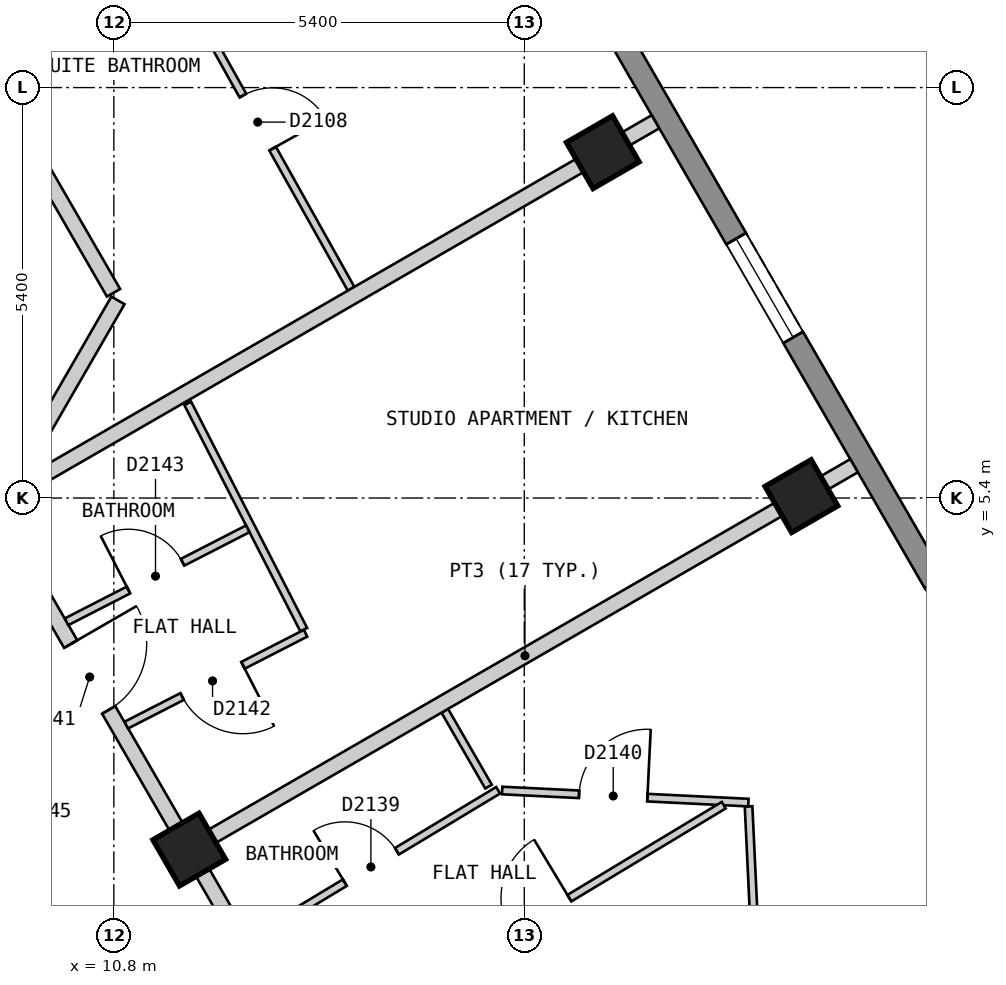
"""IFC4 building model, lengths in metres.
Left out: names, types, materials, properties, quantities, classifications, styles, units other than length and angle.
Written with IfcOpenShell. Run it as: python <this file> out.ifc"""

import sys

from ifc_helpers import new_model, si_unit, direction, frame, frame_2d, origin, origin_2d, place, context, subcontext, project, spatial, polyline, rectangle, outline, extrude, element, fill, save


model = new_model("IFC4")
c1 = context("Model", 3, precision=1e-05, world=origin(), true_north=direction((0.0, 1.0)))
c2 = subcontext(c1, "Body", "Model", "MODEL_VIEW")
j1 = project(units=[si_unit("LENGTHUNIT", "METRE"), si_unit("PLANEANGLEUNIT", "RADIAN")], contexts=[c1])
p1 = place(None, origin())
s1 = spatial("IfcSite", under=j1, at=p1, CompositionType="ELEMENT")
p2 = place(p1, origin())
s2 = spatial("IfcBuilding", under=s1, at=p2, CompositionType="ELEMENT")
p3 = place(p2, frame((0.0, 0.0, 205.8)))
s3 = spatial("IfcBuildingStorey", under=s2, at=p3, CompositionType="ELEMENT", Elevation=205.8)
for number, where, z_axis, x_axis in (
    (1, (19.846, 5.425, 0.0), (0.0, 0.0, 1.0), (-0.5, 0.866, 0.0)),
    (2, (17.233, 9.95, 0.0), (0.0, 0.0, 1.0), (-0.5, 0.866, 0.0)),
    (3, (11.792, 0.775, 0.0), (0.0, 0.0, 1.0), (-0.5, 0.866, 0.0)),
):
    element("IfcColumn", number, at=place(p3, frame(where, z_axis=z_axis, x_axis=x_axis)), inside=s3, PredefinedType="COLUMN", context=c2, shape_type="SweptSolid", body=[
        extrude(rectangle(XDim=0.7, YDim=0.7, at=origin_2d()), origin(), (0.0, 0.0, 1.0), 3.0),
    ])
p4 = place(p3, frame((23.599, 0.825, 0.0), z_axis=(0.0, 0.0, 1.0), x_axis=(-0.500003656944, 0.866023292436, 0.0)))
e4 = element("IfcWall", 4, at=p4, inside=s3, PredefinedType="SOLIDWALL", context=c2, shape_type="SweptSolid", body=[
    extrude(outline(polyline([(0.0, -0.15), (22.17, -0.15), (22.09, 0.15), (0.08, 0.15), (0.0, -0.15)])), origin(), (0.0, 0.0, 1.0), 2.7),
])
p5 = place(p4, frame((2.497, 0.0, 0.15)))
e5 = element("IfcOpeningElement", 5, at=p5, cuts=e4, PredefinedType="OPENING", context=c2, shape_type="SweptSolid", body=[
    extrude(rectangle(XDim=1.5, YDim=2.1, at=frame_2d((0.75, 1.05))), frame((0.0, 0.16, 0.0), z_axis=(0.0, -1.0, 0.0), x_axis=(1.0, 0.0, 0.0)), (0.0, 0.0, 1.0), 0.32),
])
p6 = place(p4, frame((7.723, 0.0, 0.15)))
e6 = element("IfcOpeningElement", 6, at=p6, cuts=e4, PredefinedType="OPENING", context=c2, shape_type="SweptSolid", body=[
    extrude(rectangle(XDim=1.5, YDim=2.1, at=frame_2d((0.75, 1.05))), frame((0.0, 0.16, 0.0), z_axis=(0.0, -1.0, 0.0), x_axis=(1.0, 0.0, 0.0)), (0.0, 0.0, 1.0), 0.32),
])
p7 = place(p4, frame((12.948, 0.0, 0.15)))
e7 = element("IfcOpeningElement", 7, at=p7, cuts=e4, PredefinedType="OPENING", context=c2, shape_type="SweptSolid", body=[
    extrude(rectangle(XDim=1.5, YDim=2.1, at=frame_2d((0.75, 1.05))), frame((0.0, 0.16, 0.0), z_axis=(0.0, -1.0, 0.0), x_axis=(1.0, 0.0, 0.0)), (0.0, 0.0, 1.0), 0.32),
])
p8 = place(p4, frame((18.173, 0.0, 0.15)))
e8 = element("IfcOpeningElement", 8, at=p8, cuts=e4, PredefinedType="OPENING", context=c2, shape_type="SweptSolid", body=[
    extrude(rectangle(XDim=1.5, YDim=2.1, at=frame_2d((0.75, 1.05))), frame((0.0, 0.16, 0.0), z_axis=(0.0, -1.0, 0.0), x_axis=(1.0, 0.0, 0.0)), (0.0, 0.0, 1.0), 0.32),
])
p9 = place(p3, frame((8.026, 2.899, 0.0), z_axis=(0.0, 0.0, 1.0), x_axis=(0.499986018985, -0.866033475577, 0.0)))
e9 = element("IfcWall", 9, at=p9, inside=s3, PredefinedType="PARTITIONING", context=c2, shape_type="SweptSolid", body=[
    extrude(rectangle(XDim=5.078, YDim=0.2, at=frame_2d((2.539, 0.0))), origin(), (0.0, 0.0, 1.0), 2.7),
])
p10 = place(p9, frame((2.089, 0.0, 0.0)))
e10 = element("IfcOpeningElement", 10, at=p10, cuts=e9, PredefinedType="OPENING", context=c2, shape_type="SweptSolid", body=[
    extrude(rectangle(XDim=0.9, YDim=2.1, at=frame_2d((0.45, 1.05))), frame((0.0, 0.11, 0.0), z_axis=(0.0, -1.0, 0.0), x_axis=(1.0, 0.0, 0.0)), (0.0, 0.0, 1.0), 0.22),
])
p11 = place(p3, frame((9.238, 5.2, 0.0), z_axis=(0.0, 0.0, 1.0), x_axis=(0.500025705601, -0.86601056214, 0.0)))
e11 = element("IfcWall", 11, at=p11, inside=s3, PredefinedType="PARTITIONING", context=c2, shape_type="SweptSolid", body=[
    extrude(rectangle(XDim=7.735, YDim=0.2, at=frame_2d((3.868, 0.0))), origin(), (0.0, 0.0, 1.0), 2.7),
])
p12 = place(p11, frame((6.705, 0.0, 0.0)))
e12 = element("IfcOpeningElement", 12, at=p12, cuts=e11, PredefinedType="OPENING", context=c2, shape_type="SweptSolid", body=[
    extrude(rectangle(XDim=1.0, YDim=2.1, at=frame_2d((0.5, 1.05))), frame((0.0, 0.11, 0.0), z_axis=(0.0, -1.0, 0.0), x_axis=(1.0, 0.0, 0.0)), (0.0, 0.0, 1.0), 0.22),
])
p13 = place(p11, frame((1.988, 0.0, 0.0)))
e13 = element("IfcOpeningElement", 13, at=p13, cuts=e11, PredefinedType="OPENING", context=c2, shape_type="SweptSolid", body=[
    extrude(rectangle(XDim=1.0, YDim=2.1, at=frame_2d((0.5, 1.05))), frame((0.0, 0.11, 0.0), z_axis=(0.0, -1.0, 0.0), x_axis=(1.0, 0.0, 0.0)), (0.0, 0.0, 1.0), 0.22),
])
p14 = place(p3, frame((5.485, 17.3, 0.0), z_axis=(0.0, 0.0, 1.0), x_axis=(0.499943285704, -0.866058145322, 0.0)))
e14 = element("IfcWall", 14, at=p14, inside=s3, PredefinedType="PARTITIONING", context=c2, shape_type="SweptSolid", body=[
    extrude(rectangle(XDim=10.623, YDim=0.2, at=frame_2d((5.312, 0.0))), origin(), (0.0, 0.0, 1.0), 2.7),
])
p15 = place(p3, frame((9.454, 5.574, 0.0), z_axis=(0.0, 0.0, 1.0), x_axis=(0.499795394297, 0.86614350072, 0.0)))
e15 = element("IfcWall", 15, at=p15, inside=s3, PredefinedType="PARTITIONING", context=c2, shape_type="SweptSolid", body=[
    extrude(rectangle(XDim=2.801, YDim=0.2, at=frame_2d((1.4, 0.0))), origin(), (0.0, 0.0, 1.0), 2.7),
])
p16 = place(p3, frame((15.154, 2.601, 0.0), z_axis=(0.0, 0.0, 1.0), x_axis=(0.499808046739, -0.866136199691, 0.0)))
e16 = element("IfcWall", 16, at=p16, inside=s3, PredefinedType="PARTITIONING", context=c2, shape_type="SweptSolid", body=[
    extrude(rectangle(XDim=1.152, YDim=0.1, at=frame_2d((0.576, 0.0))), origin(), (0.0, 0.0, 1.0), 2.7),
])
p17 = place(p3, frame((11.441, 12.582, 0.0), z_axis=(0.0, 0.0, 1.0), x_axis=(0.488568218554, -0.872525699231, 0.0)))
e17 = element("IfcWall", 17, at=p17, inside=s3, PredefinedType="PARTITIONING", context=c2, shape_type="SweptSolid", body=[
    extrude(rectangle(XDim=5.076, YDim=0.1, at=frame_2d((2.538, 0.0))), origin(), (0.0, 0.0, 1.0), 2.7),
])
p18 = place(p17, frame((2.163, 0.0, 0.0)))
e18 = element("IfcOpeningElement", 18, at=p18, cuts=e17, PredefinedType="OPENING", context=c2, shape_type="SweptSolid", body=[
    extrude(rectangle(XDim=0.8, YDim=2.1, at=frame_2d((0.4, 1.05))), frame((0.0, 0.06, 0.0), z_axis=(0.0, -1.0, 0.0), x_axis=(1.0, 0.0, 0.0)), (0.0, 0.0, 1.0), 0.12),
])
p19 = place(p3, frame((11.772, 6.646, 0.0), z_axis=(0.0, 0.0, 1.0), x_axis=(0.456175983405, -0.889889584254, 0.0)))
e19 = element("IfcWall", 19, at=p19, inside=s3, PredefinedType="PARTITIONING", context=c2, shape_type="SweptSolid", body=[
    extrude(rectangle(XDim=3.348, YDim=0.1, at=frame_2d((1.674, 0.0))), origin(), (0.0, 0.0, 1.0), 2.7),
])
p20 = place(p3, frame((19.151, 1.343, 0.0), z_axis=(0.0, 0.0, 1.0), x_axis=(0.047509130714, -0.998870803707, 0.0)))
e20 = element("IfcWall", 20, at=p20, inside=s3, PredefinedType="PARTITIONING", context=c2, shape_type="SweptSolid", body=[
    extrude(rectangle(XDim=3.52, YDim=0.1, at=frame_2d((1.76, 0.0))), origin(), (0.0, 0.0, 1.0), 2.7),
])
p21 = place(p3, frame((15.909, 1.552, 0.0), z_axis=(0.0, 0.0, 1.0), x_axis=(0.998799003463, -0.048995414909, 0.0)))
e21 = element("IfcWall", 21, at=p21, inside=s3, PredefinedType="PARTITIONING", context=c2, shape_type="SweptSolid", body=[
    extrude(rectangle(XDim=3.244, YDim=0.1, at=frame_2d((1.622, 0.0))), origin(), (0.0, 0.0, 1.0), 2.7),
])
p22 = place(p21, frame((1.013, 0.0, 0.0)))
e22 = element("IfcOpeningElement", 22, at=p22, cuts=e21, PredefinedType="OPENING", context=c2, shape_type="SweptSolid", body=[
    extrude(rectangle(XDim=0.9, YDim=2.1, at=frame_2d((0.45, 1.05))), frame((0.0, 0.06, 0.0), z_axis=(0.0, -1.0, 0.0), x_axis=(1.0, 0.0, 0.0)), (0.0, 0.0, 1.0), 0.12),
])
p23 = place(p3, frame((10.178, 3.772, 0.0), z_axis=(0.0, 0.0, 1.0), x_axis=(0.889732071959, 0.456483121405, 0.0)))
e23 = element("IfcWall", 23, at=p23, inside=s3, PredefinedType="PARTITIONING", context=c2, shape_type="SweptSolid", body=[
    extrude(rectangle(XDim=2.679, YDim=0.1, at=frame_2d((1.34, 0.0))), origin(), (0.0, 0.0, 1.0), 2.7),
])
p24 = place(p23, frame((0.915, 0.0, 0.0)))
e24 = element("IfcOpeningElement", 24, at=p24, cuts=e23, PredefinedType="OPENING", context=c2, shape_type="SweptSolid", body=[
    extrude(rectangle(XDim=0.8, YDim=2.1, at=frame_2d((0.4, 1.05))), frame((0.0, 0.06, 0.0), z_axis=(0.0, -1.0, 0.0), x_axis=(1.0, 0.0, 0.0)), (0.0, 0.0, 1.0), 0.12),
])
p25 = place(p3, frame((10.963, 2.412, 0.0), z_axis=(0.0, 0.0, 1.0), x_axis=(0.889943997558, 0.456069820543, 0.0)))
e25 = element("IfcWall", 25, at=p25, inside=s3, PredefinedType="PARTITIONING", context=c2, shape_type="SweptSolid", body=[
    extrude(rectangle(XDim=2.651, YDim=0.1, at=frame_2d((1.325, 0.0))), origin(), (0.0, 0.0, 1.0), 2.7),
])
p26 = place(p25, frame((0.826, 0.0, 0.0)))
e26 = element("IfcOpeningElement", 26, at=p26, cuts=e25, PredefinedType="OPENING", context=c2, shape_type="SweptSolid", body=[
    extrude(rectangle(XDim=0.9, YDim=2.1, at=frame_2d((0.45, 1.05))), frame((0.0, 0.06, 0.0), z_axis=(0.0, -1.0, 0.0), x_axis=(1.0, 0.0, 0.0)), (0.0, 0.0, 1.0), 0.12),
])
p27 = place(p3, frame((9.079, 11.275, 0.0), z_axis=(0.0, 0.0, 1.0), x_axis=(0.866001485781, 0.500041424909, 0.0)))
e27 = element("IfcWall", 27, at=p27, inside=s3, PredefinedType="PARTITIONING", context=c2, shape_type="SweptSolid", body=[
    extrude(rectangle(XDim=7.2, YDim=0.1, at=frame_2d((3.6, 0.0))), origin(), (0.0, 0.0, 1.0), 2.7),
])
p28 = place(p27, frame((4.5, 0.0, 0.0)))
e28 = element("IfcOpeningElement", 28, at=p28, cuts=e27, PredefinedType="OPENING", context=c2, shape_type="SweptSolid", body=[
    extrude(rectangle(XDim=0.9, YDim=2.1, at=frame_2d((0.45, 1.05))), frame((0.0, 0.06, 0.0), z_axis=(0.0, -1.0, 0.0), x_axis=(1.0, 0.0, 0.0)), (0.0, 0.0, 1.0), 0.12),
])
p29 = place(p3, frame((12.593, -0.411, 0.0), z_axis=(0.0, 0.0, 1.0), x_axis=(0.856558445359, 0.516050026339, 0.0)))
e29 = element("IfcWall", 29, at=p29, inside=s3, PredefinedType="PARTITIONING", context=c2, shape_type="SweptSolid", body=[
    extrude(rectangle(XDim=3.809, YDim=0.1, at=frame_2d((1.905, 0.0))), origin(), (0.0, 0.0, 1.0), 2.7),
])
p30 = place(p29, frame((1.455, 0.0, 0.0)))
e30 = element("IfcOpeningElement", 30, at=p30, cuts=e29, PredefinedType="OPENING", context=c2, shape_type="SweptSolid", body=[
    extrude(rectangle(XDim=0.8, YDim=2.1, at=frame_2d((0.4, 1.05))), frame((0.0, 0.06, 0.0), z_axis=(0.0, -1.0, 0.0), x_axis=(1.0, 0.0, 0.0)), (0.0, 0.0, 1.0), 0.12),
])
p31 = place(p3, frame((14.081, -1.499, 0.0), z_axis=(0.0, 0.0, 1.0), x_axis=(0.85652273816, 0.516109289798, 0.0)))
e31 = element("IfcWall", 31, at=p31, inside=s3, PredefinedType="PARTITIONING", context=c2, shape_type="SweptSolid", body=[
    extrude(rectangle(XDim=5.537, YDim=0.1, at=frame_2d((2.769, 0.0))), origin(), (0.0, 0.0, 1.0), 2.7),
])
p32 = place(p31, frame((2.267, 0.0, 0.0)))
e32 = element("IfcOpeningElement", 32, at=p32, cuts=e31, PredefinedType="OPENING", context=c2, shape_type="SweptSolid", body=[
    extrude(rectangle(XDim=0.9, YDim=2.1, at=frame_2d((0.45, 1.05))), frame((0.0, 0.06, 0.0), z_axis=(0.0, -1.0, 0.0), x_axis=(1.0, 0.0, 0.0)), (0.0, 0.0, 1.0), 0.12),
])
p33 = place(p3, frame((11.879, 0.826, 0.0), z_axis=(0.0, 0.0, 1.0), x_axis=(0.866065245018, 0.499930986609, 0.0)))
e33 = element("IfcWall", 33, at=p33, inside=s3, PredefinedType="PARTITIONING", context=c2, shape_type="SweptSolid", body=[
    extrude(rectangle(XDim=10.0, YDim=0.2, at=frame_2d((5.0, 0.0))), origin(), (0.0, 0.0, 1.0), 2.7),
])
p34 = place(p3, frame((9.354, 5.401, 0.0), z_axis=(0.0, 0.0, 1.0), x_axis=(0.866018411306, 0.500012111133, 0.0)))
e34 = element("IfcWall", 34, at=p34, inside=s3, PredefinedType="PARTITIONING", context=c2, shape_type="SweptSolid", body=[
    extrude(rectangle(XDim=9.898, YDim=0.2, at=frame_2d((4.949, 0.0))), origin(), (0.0, 0.0, 1.0), 2.7),
])
p35 = place(p6, origin())
e35 = element("IfcWindow", 35, at=p35, inside=s3, PartitioningType="SINGLE_PANEL", PredefinedType="WINDOW", context=c2, shape_type="SweptSolid", body=[
    extrude(rectangle(XDim=1.5, YDim=2.1, at=frame_2d((0.75, 1.05))), frame((0.0, 0.03, 0.0), z_axis=(0.0, -1.0, 0.0), x_axis=(1.0, 0.0, 0.0)), (0.0, 0.0, 1.0), 0.06),
])
fill(e6, e35)
p36 = place(p18, origin())
e36 = element("IfcDoor", 36, at=p36, inside=s3, OperationType="SINGLE_SWING_RIGHT", PredefinedType="DOOR", context=c2, shape_type="SweptSolid", body=[
    extrude(rectangle(XDim=0.8, YDim=2.1, at=frame_2d((0.4, 1.05))), frame((0.0, 0.025, 0.0), z_axis=(0.0, -1.0, 0.0), x_axis=(1.0, 0.0, 0.0)), (0.0, 0.0, 1.0), 0.05),
])
fill(e18, e36)
p37 = place(p32, origin())
e37 = element("IfcDoor", 37, at=p37, inside=s3, OperationType="SINGLE_SWING_RIGHT", PredefinedType="DOOR", context=c2, shape_type="SweptSolid", body=[
    extrude(rectangle(XDim=0.9, YDim=2.1, at=frame_2d((0.45, 1.05))), frame((0.0, 0.025, 0.0), z_axis=(0.0, -1.0, 0.0), x_axis=(1.0, 0.0, 0.0)), (0.0, 0.0, 1.0), 0.05),
])
fill(e32, e37)
p38 = place(p30, origin())
e38 = element("IfcDoor", 38, at=p38, inside=s3, OperationType="SINGLE_SWING_LEFT", PredefinedType="DOOR", context=c2, shape_type="SweptSolid", body=[
    extrude(rectangle(XDim=0.8, YDim=2.1, at=frame_2d((0.4, 1.05))), frame((0.0, 0.025, 0.0), z_axis=(0.0, -1.0, 0.0), x_axis=(1.0, 0.0, 0.0)), (0.0, 0.0, 1.0), 0.05),
])
fill(e30, e38)
p39 = place(p22, origin())
e39 = element("IfcDoor", 39, at=p39, inside=s3, OperationType="SINGLE_SWING_RIGHT", PredefinedType="DOOR", context=c2, shape_type="SweptSolid", body=[
    extrude(rectangle(XDim=0.9, YDim=2.1, at=frame_2d((0.45, 1.05))), frame((0.0, 0.025, 0.0), z_axis=(0.0, -1.0, 0.0), x_axis=(1.0, 0.0, 0.0)), (0.0, 0.0, 1.0), 0.05),
])
fill(e22, e39)
p40 = place(p13, origin())
e40 = element("IfcDoor", 40, at=p40, inside=s3, OperationType="SINGLE_SWING_LEFT", PredefinedType="DOOR", context=c2, shape_type="SweptSolid", body=[
    extrude(rectangle(XDim=1.0, YDim=2.1, at=frame_2d((0.5, 1.05))), frame((0.0, 0.025, 0.0), z_axis=(0.0, -1.0, 0.0), x_axis=(1.0, 0.0, 0.0)), (0.0, 0.0, 1.0), 0.05),
])
fill(e13, e40)
p41 = place(p26, origin())
e41 = element("IfcDoor", 41, at=p41, inside=s3, OperationType="SINGLE_SWING_RIGHT", PredefinedType="DOOR", context=c2, shape_type="SweptSolid", body=[
    extrude(rectangle(XDim=0.9, YDim=2.1, at=frame_2d((0.45, 1.05))), frame((0.0, 0.025, 0.0), z_axis=(0.0, -1.0, 0.0), x_axis=(1.0, 0.0, 0.0)), (0.0, 0.0, 1.0), 0.05),
])
fill(e26, e41)
p42 = place(p24, origin())
e42 = element("IfcDoor", 42, at=p42, inside=s3, OperationType="SINGLE_SWING_LEFT", PredefinedType="DOOR", context=c2, shape_type="SweptSolid", body=[
    extrude(rectangle(XDim=0.8, YDim=2.1, at=frame_2d((0.4, 1.05))), frame((0.0, 0.025, 0.0), z_axis=(0.0, -1.0, 0.0), x_axis=(1.0, 0.0, 0.0)), (0.0, 0.0, 1.0), 0.05),
])
fill(e24, e42)
save(model, sys.argv[1])
